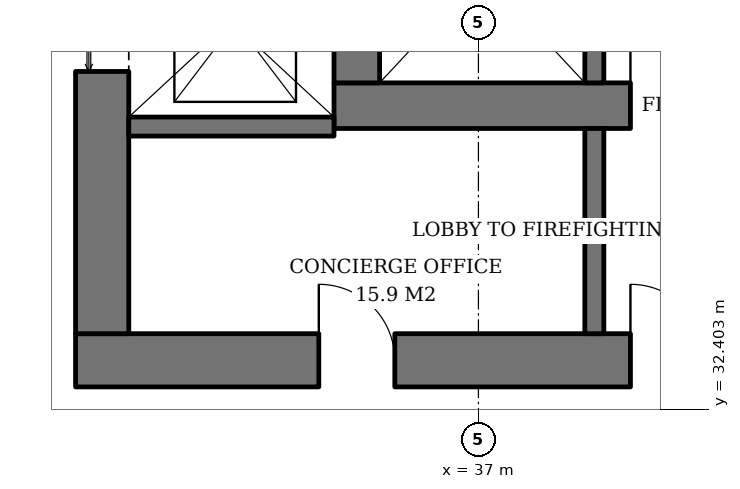
"""IFC4 building model, lengths in metres.
Left out: names, types, materials, properties, quantities, classifications, styles, units other than length and angle.
Written with IfcOpenShell. Run it as: python <this file> out.ifc"""

import sys

from ifc_helpers import new_model, si_unit, direction, frame, frame_2d, origin, place, context, subcontext, project, spatial, rectangle, extrude, element, fill, save


model = new_model("IFC4")
c1 = context("Model", 3, precision=1e-05, world=origin(), true_north=direction((0.0, 1.0)))
c2 = subcontext(c1, "Body", "Model", "MODEL_VIEW")
j1 = project(units=[si_unit("LENGTHUNIT", "METRE"), si_unit("PLANEANGLEUNIT", "RADIAN")], contexts=[c1])
p1 = place(None, origin())
s1 = spatial("IfcSite", under=j1, at=p1, CompositionType="ELEMENT")
p2 = place(p1, origin())
s2 = spatial("IfcBuilding", under=s1, at=p2, CompositionType="ELEMENT")
p3 = place(p2, frame((0.0, 0.0, 89.4)))
s3 = spatial("IfcBuildingStorey", under=s2, at=p3, CompositionType="ELEMENT", Elevation=89.4)
p4 = place(p3, frame((35.1, 36.4, 0.0), z_axis=(0.0, 0.0, 1.0), x_axis=(1.0, 0.0, 0.0)))
e1 = element("IfcWall", 1, at=p4, inside=s3, PredefinedType="SHEAR", context=c2, shape_type="SweptSolid", body=[
    extrude(rectangle(XDim=19.8, YDim=0.6, at=frame_2d((9.9, 0.0))), origin(), (0.0, 0.0, 1.0), 3.8),
])
p5 = place(p4, frame((3.9, 0.0, 0.0)))
e2 = element("IfcOpeningElement", 2, at=p5, cuts=e1, PredefinedType="OPENING", context=c2, shape_type="SweptSolid", body=[
    extrude(rectangle(XDim=1.0, YDim=2.1, at=frame_2d((0.5, 1.05))), frame((0.0, 0.31, 0.0), z_axis=(0.0, -1.0, 0.0), x_axis=(1.0, 0.0, 0.0)), (0.0, 0.0, 1.0), 0.62),
])
p6 = place(p4, frame((15.35, 0.0, 0.0)))
e3 = element("IfcOpeningElement", 3, at=p6, cuts=e1, PredefinedType="OPENING", context=c2, shape_type="SweptSolid", body=[
    extrude(rectangle(XDim=1.0, YDim=2.1, at=frame_2d((0.5, 1.05))), frame((0.0, 0.31, 0.0), z_axis=(0.0, -1.0, 0.0), x_axis=(1.0, 0.0, 0.0)), (0.0, 0.0, 1.0), 0.62),
])
p7 = place(p3, frame((35.4, 36.7, 0.0), z_axis=(0.0, 0.0, 1.0), x_axis=(0.0, 1.0, 0.0)))
e4 = element("IfcWall", 4, at=p7, inside=s3, PredefinedType="SHEAR", context=c2, shape_type="SweptSolid", body=[
    extrude(rectangle(XDim=18.6, YDim=0.6, at=frame_2d((9.3, 0.0))), origin(), (0.0, 0.0, 1.0), 3.8),
])
p8 = place(p7, frame((8.4, 0.0, 0.0)))
e5 = element("IfcOpeningElement", 5, at=p8, cuts=e4, PredefinedType="OPENING", context=c2, shape_type="SweptSolid", body=[
    extrude(rectangle(XDim=1.8, YDim=2.4, at=frame_2d((0.9, 1.2))), frame((0.0, 0.31, 0.0), z_axis=(0.0, -1.0, 0.0), x_axis=(1.0, 0.0, 0.0)), (0.0, 0.0, 1.0), 0.62),
])
p9 = place(p3, frame((31.7, 33.05, 0.0), z_axis=(0.0, 0.0, 1.0), x_axis=(1.0, 0.0, 0.0)))
e6 = element("IfcWall", 6, at=p9, inside=s3, PredefinedType="SHEAR", context=c2, shape_type="SweptSolid", body=[
    extrude(rectangle(XDim=26.6, YDim=0.7, at=frame_2d((13.3, 0.0))), origin(), (0.0, 0.0, 1.0), 3.8),
])
p10 = place(p9, frame((7.3, 0.0, 0.0)))
e7 = element("IfcOpeningElement", 7, at=p10, cuts=e6, PredefinedType="OPENING", context=c2, shape_type="SweptSolid", body=[
    extrude(rectangle(XDim=1.0, YDim=2.1, at=frame_2d((0.5, 1.05))), frame((0.0, 0.36, 0.0), z_axis=(0.0, -1.0, 0.0), x_axis=(1.0, 0.0, 0.0)), (0.0, 0.0, 1.0), 0.72),
])
p11 = place(p9, frame((18.75, 0.0, 0.0)))
e8 = element("IfcOpeningElement", 8, at=p11, cuts=e6, PredefinedType="OPENING", context=c2, shape_type="SweptSolid", body=[
    extrude(rectangle(XDim=1.0, YDim=2.1, at=frame_2d((0.5, 1.05))), frame((0.0, 0.36, 0.0), z_axis=(0.0, -1.0, 0.0), x_axis=(1.0, 0.0, 0.0)), (0.0, 0.0, 1.0), 0.72),
])
p12 = place(p9, frame((3.2, 0.0, 0.0)))
e9 = element("IfcOpeningElement", 9, at=p12, cuts=e6, PredefinedType="OPENING", context=c2, shape_type="SweptSolid", body=[
    extrude(rectangle(XDim=1.0, YDim=2.1, at=frame_2d((0.5, 1.05))), frame((0.0, 0.36, 0.0), z_axis=(0.0, -1.0, 0.0), x_axis=(1.0, 0.0, 0.0)), (0.0, 0.0, 1.0), 0.72),
])
p13 = place(p9, frame((10.42, 0.0, 0.0)))
e10 = element("IfcOpeningElement", 10, at=p13, cuts=e6, PredefinedType="OPENING", context=c2, shape_type="SweptSolid", body=[
    extrude(rectangle(XDim=1.0, YDim=2.1, at=frame_2d((0.5, 1.05))), frame((0.0, 0.36, 0.0), z_axis=(0.0, -1.0, 0.0), x_axis=(1.0, 0.0, 0.0)), (0.0, 0.0, 1.0), 0.72),
])
p14 = place(p9, frame((14.46, 0.0, 0.0)))
e11 = element("IfcOpeningElement", 11, at=p14, cuts=e6, PredefinedType="OPENING", context=c2, shape_type="SweptSolid", body=[
    extrude(rectangle(XDim=1.0, YDim=2.1, at=frame_2d((0.5, 1.05))), frame((0.0, 0.36, 0.0), z_axis=(0.0, -1.0, 0.0), x_axis=(1.0, 0.0, 0.0)), (0.0, 0.0, 1.0), 0.72),
])
p15 = place(p9, frame((22.5, 0.0, 0.0)))
e12 = element("IfcOpeningElement", 12, at=p15, cuts=e6, PredefinedType="OPENING", context=c2, shape_type="SweptSolid", body=[
    extrude(rectangle(XDim=1.0, YDim=2.1, at=frame_2d((0.5, 1.05))), frame((0.0, 0.36, 0.0), z_axis=(0.0, -1.0, 0.0), x_axis=(1.0, 0.0, 0.0)), (0.0, 0.0, 1.0), 0.72),
])
p16 = place(p3, frame((32.05, 33.4, 0.0), z_axis=(0.0, 0.0, 1.0), x_axis=(0.0, 1.0, 0.0)))
e13 = element("IfcWall", 13, at=p16, inside=s3, PredefinedType="SHEAR", context=c2, shape_type="SweptSolid", body=[
    extrude(rectangle(XDim=25.2, YDim=0.7, at=frame_2d((12.6, 0.0))), origin(), (0.0, 0.0, 1.0), 3.8),
])
p17 = place(p16, frame((3.45, 0.0, 0.0)))
e14 = element("IfcOpeningElement", 14, at=p17, cuts=e13, PredefinedType="OPENING", context=c2, shape_type="SweptSolid", body=[
    extrude(rectangle(XDim=1.3, YDim=2.2, at=frame_2d((0.65, 1.1))), frame((0.0, 0.36, 0.0), z_axis=(0.0, -1.0, 0.0), x_axis=(1.0, 0.0, 0.0)), (0.0, 0.0, 1.0), 0.72),
])
p18 = place(p16, frame((6.2, 0.0, 0.0)))
e15 = element("IfcOpeningElement", 15, at=p18, cuts=e13, PredefinedType="OPENING", context=c2, shape_type="SweptSolid", body=[
    extrude(rectangle(XDim=1.3, YDim=2.2, at=frame_2d((0.65, 1.1))), frame((0.0, 0.36, 0.0), z_axis=(0.0, -1.0, 0.0), x_axis=(1.0, 0.0, 0.0)), (0.0, 0.0, 1.0), 0.72),
])
p19 = place(p16, frame((8.95, 0.0, 0.0)))
e16 = element("IfcOpeningElement", 16, at=p19, cuts=e13, PredefinedType="OPENING", context=c2, shape_type="SweptSolid", body=[
    extrude(rectangle(XDim=1.3, YDim=2.2, at=frame_2d((0.65, 1.1))), frame((0.0, 0.36, 0.0), z_axis=(0.0, -1.0, 0.0), x_axis=(1.0, 0.0, 0.0)), (0.0, 0.0, 1.0), 0.72),
])
p20 = place(p16, frame((14.95, 0.0, 0.0)))
e17 = element("IfcOpeningElement", 17, at=p20, cuts=e13, PredefinedType="OPENING", context=c2, shape_type="SweptSolid", body=[
    extrude(rectangle(XDim=1.3, YDim=2.2, at=frame_2d((0.65, 1.1))), frame((0.0, 0.36, 0.0), z_axis=(0.0, -1.0, 0.0), x_axis=(1.0, 0.0, 0.0)), (0.0, 0.0, 1.0), 0.72),
])
p21 = place(p16, frame((17.7, 0.0, 0.0)))
e18 = element("IfcOpeningElement", 18, at=p21, cuts=e13, PredefinedType="OPENING", context=c2, shape_type="SweptSolid", body=[
    extrude(rectangle(XDim=1.3, YDim=2.2, at=frame_2d((0.65, 1.1))), frame((0.0, 0.36, 0.0), z_axis=(0.0, -1.0, 0.0), x_axis=(1.0, 0.0, 0.0)), (0.0, 0.0, 1.0), 0.72),
])
p22 = place(p16, frame((11.7, 0.0, 0.0)))
e19 = element("IfcOpeningElement", 19, at=p22, cuts=e13, PredefinedType="OPENING", context=c2, shape_type="SweptSolid", body=[
    extrude(rectangle(XDim=1.8, YDim=2.4, at=frame_2d((0.9, 1.2))), frame((0.0, 0.36, 0.0), z_axis=(0.0, -1.0, 0.0), x_axis=(1.0, 0.0, 0.0)), (0.0, 0.0, 1.0), 0.72),
])
p23 = place(p3, frame((38.525, 36.7, 0.0), z_axis=(0.0, 0.0, 1.0), x_axis=(0.0, 1.0, 0.0)))
e20 = element("IfcWall", 20, at=p23, inside=s3, PredefinedType="SHEAR", context=c2, shape_type="SweptSolid", body=[
    extrude(rectangle(XDim=2.9, YDim=0.25, at=frame_2d((1.45, 0.0))), origin(), (0.0, 0.0, 1.0), 3.8),
])
p24 = place(p23, frame((0.8, 0.0, 0.0)))
e21 = element("IfcOpeningElement", 21, at=p24, cuts=e20, PredefinedType="OPENING", context=c2, shape_type="SweptSolid", body=[
    extrude(rectangle(XDim=1.3, YDim=2.2, at=frame_2d((0.65, 1.1))), frame((0.0, 0.135, 0.0), z_axis=(0.0, -1.0, 0.0), x_axis=(1.0, 0.0, 0.0)), (0.0, 0.0, 1.0), 0.27),
])
p25 = place(p3, frame((32.4, 36.125, 0.0), z_axis=(0.0, 0.0, 1.0), x_axis=(1.0, 0.0, 0.0)))
e22 = element("IfcWall", 22, at=p25, inside=s3, PredefinedType="SHEAR", context=c2, shape_type="SweptSolid", body=[
    extrude(rectangle(XDim=2.7, YDim=0.25, at=frame_2d((1.35, 0.0))), origin(), (0.0, 0.0, 1.0), 3.8),
])
p26 = place(p3, frame((38.525, 33.4, 0.0), z_axis=(0.0, 0.0, 1.0), x_axis=(0.0, 1.0, 0.0)))
e23 = element("IfcWall", 23, at=p26, inside=s3, PredefinedType="SOLIDWALL", context=c2, shape_type="SweptSolid", body=[
    extrude(rectangle(XDim=2.7, YDim=0.25, at=frame_2d((1.35, 0.0))), origin(), (0.0, 0.0, 1.0), 3.62),
])
p27 = place(p5, origin())
e24 = element("IfcDoor", 24, at=p27, inside=s3, OperationType="SINGLE_SWING_LEFT", PredefinedType="DOOR", context=c2, shape_type="SweptSolid", body=[
    extrude(rectangle(XDim=1.0, YDim=2.1, at=frame_2d((0.5, 1.05))), frame((0.0, 0.025, 0.0), z_axis=(0.0, -1.0, 0.0), x_axis=(1.0, 0.0, 0.0)), (0.0, 0.0, 1.0), 0.05),
])
fill(e2, e24)
p28 = place(p17, origin())
e25 = element("IfcDoor", 25, at=p28, inside=s3, OperationType="DOUBLE_DOOR_SLIDING", PredefinedType="DOOR", context=c2, shape_type="SweptSolid", body=[
    extrude(rectangle(XDim=1.3, YDim=2.2, at=frame_2d((0.65, 1.1))), frame((0.0, 0.025, 0.0), z_axis=(0.0, -1.0, 0.0), x_axis=(1.0, 0.0, 0.0)), (0.0, 0.0, 1.0), 0.05),
])
fill(e14, e25)
p29 = place(p10, origin())
e26 = element("IfcDoor", 26, at=p29, inside=s3, OperationType="SINGLE_SWING_LEFT", PredefinedType="DOOR", context=c2, shape_type="SweptSolid", body=[
    extrude(rectangle(XDim=1.0, YDim=2.1, at=frame_2d((0.5, 1.05))), frame((0.0, 0.025, 0.0), z_axis=(0.0, -1.0, 0.0), x_axis=(1.0, 0.0, 0.0)), (0.0, 0.0, 1.0), 0.05),
])
fill(e7, e26)
p30 = place(p12, origin())
e27 = element("IfcDoor", 27, at=p30, inside=s3, OperationType="SINGLE_SWING_LEFT", PredefinedType="DOOR", context=c2, shape_type="SweptSolid", body=[
    extrude(rectangle(XDim=1.0, YDim=2.1, at=frame_2d((0.5, 1.05))), frame((0.0, 0.34, 0.0), z_axis=(0.0, -1.0, 0.0), x_axis=(1.0, 0.0, 0.0)), (0.0, 0.0, 1.0), 0.05),
])
fill(e9, e27)
save(model, sys.argv[1])
